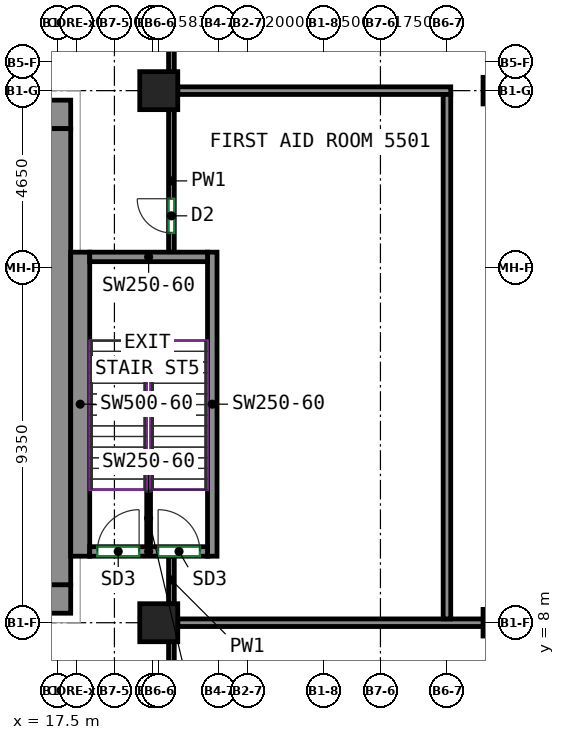
"""IFC4 building model, lengths in metres.
Left out: names, types, materials, properties, quantities, classifications, styles, units other than length and angle.
Written with IfcOpenShell. Run it as: python <this file> out.ifc"""

import sys

from ifc_helpers import new_model, si_unit, direction, frame, frame_2d, origin, origin_2d, place, context, subcontext, project, spatial, rectangle, extrude, source, transform, mapped, element, fill, save


model = new_model("IFC4")
c1 = context("Model", 3, precision=1e-05, world=origin(), true_north=direction((0.0, 1.0)))
c2 = subcontext(c1, "Body", "Model", "MODEL_VIEW")
j1 = project(units=[si_unit("LENGTHUNIT", "METRE"), si_unit("PLANEANGLEUNIT", "RADIAN")], contexts=[c1])
p1 = place(None, origin())
s1 = spatial("IfcSite", under=j1, at=p1, CompositionType="ELEMENT")
p2 = place(p1, origin())
s2 = spatial("IfcBuilding", under=s1, at=p2, CompositionType="ELEMENT")
p3 = place(p2, frame((0.0, 0.0, 223.7)))
s3 = spatial("IfcBuildingStorey", under=s2, at=p3, CompositionType="ELEMENT", Elevation=223.7)
m1 = source(origin(), c2, "Body", "SweptSolid", [
    extrude(rectangle(XDim=1.0, YDim=1.0, at=origin_2d()), origin(), (0.0, 0.0, 1.0), 5.5),
])
for number, where, z_axis, x_axis in (
    (1, (20.167, 8.0, 0.0), (0.0, 0.0, 1.0), (1.0, 0.0, 0.0)),
    (2, (20.167, 22.0, 0.0), (0.0, 0.0, 1.0), (1.0, 0.0, 0.0)),
):
    element("IfcColumn", number, at=place(p3, frame(where, z_axis=z_axis, x_axis=x_axis)), inside=s3, PredefinedType="COLUMN", context=c2, shape_type="MappedRepresentation", body=[
        mapped(m1, transform((0.0, 0.0, 0.0))),
    ])
m2 = source(origin(), c2, "Body", "SweptSolid", [
    extrude(rectangle(XDim=0.7, YDim=0.7, at=origin_2d()), origin(), (0.0, 0.0, 1.0), 9.5),
])
for number, where, z_axis, x_axis in (
    (3, (29.05, 8.0, 0.0), (0.0, 0.0, 1.0), (1.0, 0.0, 0.0)),
    (4, (29.05, 22.0, 0.0), (0.0, 0.0, 1.0), (1.0, 0.0, 0.0)),
):
    element("IfcColumn", number, at=place(p3, frame(where, z_axis=z_axis, x_axis=x_axis)), inside=s3, PredefinedType="COLUMN", context=c2, shape_type="MappedRepresentation", body=[
        mapped(m2, transform((0.0, 0.0, 0.0))),
    ])
m3 = source(origin(), c2, "Body", "SweptSolid", [
    extrude(rectangle(XDim=5.38, YDim=0.75, at=frame_2d((2.69, 0.0))), origin(), (0.0, 0.0, 1.0), 9.5),
])
p4 = place(p3, frame((12.47, 8.625, 0.0), z_axis=(0.0, 0.0, 1.0), x_axis=(1.0, 0.0, 0.0)))
e5 = element("IfcWall", 5, at=p4, inside=s3, PredefinedType="SHEAR", context=c2, shape_type="MappedRepresentation", body=[
    mapped(m3, transform((0.0, 0.0, 0.0))),
])
p5 = place(p4, frame((1.28, 0.0, 0.0)))
e6 = element("IfcOpeningElement", 6, at=p5, cuts=e5, PredefinedType="OPENING", context=c2, shape_type="SweptSolid", body=[
    extrude(rectangle(XDim=1.1, YDim=2.1, at=frame_2d((0.55, 1.05))), frame((0.0, 0.385, 0.0), z_axis=(0.0, -1.0, 0.0), x_axis=(1.0, 0.0, 0.0)), (0.0, 0.0, 1.0), 0.77),
])
p6 = place(p4, frame((3.18, 0.0, 0.0)))
e7 = element("IfcOpeningElement", 7, at=p6, cuts=e5, PredefinedType="OPENING", context=c2, shape_type="SweptSolid", body=[
    extrude(rectangle(XDim=1.1, YDim=2.1, at=frame_2d((0.55, 1.05))), frame((0.0, 0.385, 0.0), z_axis=(0.0, -1.0, 0.0), x_axis=(1.0, 0.0, 0.0)), (0.0, 0.0, 1.0), 0.77),
])
m4 = source(origin(), c2, "Body", "SweptSolid", [
    extrude(rectangle(XDim=33.6, YDim=0.75, at=frame_2d((16.8, 0.0))), origin(), (0.0, 0.0, 1.0), 9.5),
])
p7 = place(p3, frame((-15.75, 21.375, 0.0), z_axis=(0.0, 0.0, 1.0), x_axis=(1.0, 0.0, 0.0)))
e8 = element("IfcWall", 8, at=p7, inside=s3, PredefinedType="SHEAR", context=c2, shape_type="MappedRepresentation", body=[
    mapped(m4, transform((0.0, 0.0, 0.0))),
])
p8 = place(p7, frame((6.581, 0.0, 0.0)))
e9 = element("IfcOpeningElement", 9, at=p8, cuts=e8, PredefinedType="OPENING", context=c2, shape_type="SweptSolid", body=[
    extrude(rectangle(XDim=0.9, YDim=2.1, at=frame_2d((0.45, 1.05))), frame((0.0, 0.385, 0.0), z_axis=(0.0, -1.0, 0.0), x_axis=(1.0, 0.0, 0.0)), (0.0, 0.0, 1.0), 0.77),
])
p9 = place(p7, frame((11.888, 0.0, 0.0)))
e10 = element("IfcOpeningElement", 10, at=p9, cuts=e8, PredefinedType="OPENING", context=c2, shape_type="SweptSolid", body=[
    extrude(rectangle(XDim=0.9, YDim=2.1, at=frame_2d((0.45, 1.05))), frame((0.0, 0.385, 0.0), z_axis=(0.0, -1.0, 0.0), x_axis=(1.0, 0.0, 0.0)), (0.0, 0.0, 1.0), 0.77),
])
p10 = place(p7, frame((16.296, 0.0, 0.0)))
e11 = element("IfcOpeningElement", 11, at=p10, cuts=e8, PredefinedType="OPENING", context=c2, shape_type="SweptSolid", body=[
    extrude(rectangle(XDim=0.9, YDim=2.1, at=frame_2d((0.45, 1.05))), frame((0.0, 0.385, 0.0), z_axis=(0.0, -1.0, 0.0), x_axis=(1.0, 0.0, 0.0)), (0.0, 0.0, 1.0), 0.77),
])
p11 = place(p7, frame((18.708, 0.0, 0.0)))
e12 = element("IfcOpeningElement", 12, at=p11, cuts=e8, PredefinedType="OPENING", context=c2, shape_type="SweptSolid", body=[
    extrude(rectangle(XDim=0.9, YDim=2.1, at=frame_2d((0.45, 1.05))), frame((0.0, 0.385, 0.0), z_axis=(0.0, -1.0, 0.0), x_axis=(1.0, 0.0, 0.0)), (0.0, 0.0, 1.0), 0.77),
])
p12 = place(p7, frame((21.536, 0.0, 0.0)))
e13 = element("IfcOpeningElement", 13, at=p12, cuts=e8, PredefinedType="OPENING", context=c2, shape_type="SweptSolid", body=[
    extrude(rectangle(XDim=0.9, YDim=2.1, at=frame_2d((0.45, 1.05))), frame((0.0, 0.385, 0.0), z_axis=(0.0, -1.0, 0.0), x_axis=(1.0, 0.0, 0.0)), (0.0, 0.0, 1.0), 0.77),
])
p13 = place(p7, frame((25.877, 0.0, 0.0)))
e14 = element("IfcOpeningElement", 14, at=p13, cuts=e8, PredefinedType="OPENING", context=c2, shape_type="SweptSolid", body=[
    extrude(rectangle(XDim=0.9, YDim=2.1, at=frame_2d((0.45, 1.05))), frame((0.0, 0.385, 0.0), z_axis=(0.0, -1.0, 0.0), x_axis=(1.0, 0.0, 0.0)), (0.0, 0.0, 1.0), 0.77),
])
p14 = place(p7, frame((2.275, 0.0, 0.0)))
e15 = element("IfcOpeningElement", 15, at=p14, cuts=e8, PredefinedType="OPENING", context=c2, shape_type="SweptSolid", body=[
    extrude(rectangle(XDim=0.9, YDim=2.1, at=frame_2d((0.45, 1.05))), frame((0.0, 0.385, 0.0), z_axis=(0.0, -1.0, 0.0), x_axis=(1.0, 0.0, 0.0)), (0.0, 0.0, 1.0), 0.77),
])
p15 = place(p7, frame((30.425, 0.0, 0.0)))
e16 = element("IfcOpeningElement", 16, at=p15, cuts=e8, PredefinedType="OPENING", context=c2, shape_type="SweptSolid", body=[
    extrude(rectangle(XDim=0.9, YDim=2.1, at=frame_2d((0.45, 1.05))), frame((0.0, 0.385, 0.0), z_axis=(0.0, -1.0, 0.0), x_axis=(1.0, 0.0, 0.0)), (0.0, 0.0, 1.0), 0.77),
])
m5 = source(origin(), c2, "Body", "SweptSolid", [
    extrude(rectangle(XDim=12.0, YDim=0.75, at=frame_2d((6.0, 0.0))), origin(), (0.0, 0.0, 1.0), 9.5),
])
p16 = place(p3, frame((17.475, 9.0, 0.0), z_axis=(0.0, 0.0, 1.0), x_axis=(0.0, 1.0, 0.0)))
e17 = element("IfcWall", 17, at=p16, inside=s3, PredefinedType="SHEAR", context=c2, shape_type="MappedRepresentation", body=[
    mapped(m5, transform((0.0, 0.0, 0.0))),
])
m6 = source(origin(), c2, "Body", "SweptSolid", [
    extrude(rectangle(XDim=8.0, YDim=0.5, at=frame_2d((4.0, 0.0))), origin(), (0.0, 0.0, 1.0), 9.5),
])
p17 = place(p3, frame((18.1, 9.75, 0.0), z_axis=(0.0, 0.0, 1.0), x_axis=(0.0, 1.0, 0.0)))
e18 = element("IfcWall", 18, at=p17, inside=s3, PredefinedType="SHEAR", context=c2, shape_type="MappedRepresentation", body=[
    mapped(m6, transform((0.0, 0.0, 0.0))),
])
m7 = source(origin(), c2, "Body", "SweptSolid", [
    extrude(rectangle(XDim=8.0, YDim=0.25, at=frame_2d((4.0, 0.0))), origin(), (0.0, 0.0, 1.0), 9.5),
])
p18 = place(p3, frame((21.575, 9.75, 0.0), z_axis=(0.0, 0.0, 1.0), x_axis=(0.0, 1.0, 0.0)))
e19 = element("IfcWall", 19, at=p18, inside=s3, PredefinedType="SHEAR", context=c2, shape_type="MappedRepresentation", body=[
    mapped(m7, transform((0.0, 0.0, 0.0))),
])
m8 = source(origin(), c2, "Body", "SweptSolid", [
    extrude(rectangle(XDim=3.1, YDim=0.25, at=frame_2d((1.55, 0.0))), origin(), (0.0, 0.0, 1.0), 9.5),
])
p19 = place(p3, frame((18.35, 9.875, 0.0), z_axis=(0.0, 0.0, 1.0), x_axis=(1.0, 0.0, 0.0)))
e20 = element("IfcWall", 20, at=p19, inside=s3, PredefinedType="SHEAR", context=c2, shape_type="MappedRepresentation", body=[
    mapped(m8, transform((0.0, 0.0, 0.0))),
])
p20 = place(p19, frame((0.2, 0.0, 0.0)))
e21 = element("IfcOpeningElement", 21, at=p20, cuts=e20, PredefinedType="OPENING", context=c2, shape_type="SweptSolid", body=[
    extrude(rectangle(XDim=1.1, YDim=2.1, at=frame_2d((0.55, 1.05))), frame((0.0, 0.135, 0.0), z_axis=(0.0, -1.0, 0.0), x_axis=(1.0, 0.0, 0.0)), (0.0, 0.0, 1.0), 0.27),
])
p21 = place(p19, frame((1.8, 0.0, 0.0)))
e22 = element("IfcOpeningElement", 22, at=p21, cuts=e20, PredefinedType="OPENING", context=c2, shape_type="SweptSolid", body=[
    extrude(rectangle(XDim=1.1, YDim=2.1, at=frame_2d((0.55, 1.05))), frame((0.0, 0.135, 0.0), z_axis=(0.0, -1.0, 0.0), x_axis=(1.0, 0.0, 0.0)), (0.0, 0.0, 1.0), 0.27),
])
p22 = place(p3, frame((18.35, 17.625, 0.0), z_axis=(0.0, 0.0, 1.0), x_axis=(1.0, 0.0, 0.0)))
e23 = element("IfcWall", 23, at=p22, inside=s3, PredefinedType="SHEAR", context=c2, shape_type="MappedRepresentation", body=[
    mapped(m8, transform((0.0, 0.0, 0.0))),
])
m9 = source(origin(), c2, "Body", "SweptSolid", [
    extrude(rectangle(XDim=1.5, YDim=0.1, at=frame_2d((0.75, 0.0))), origin(), (0.0, 0.0, 1.0), 4.75),
])
p23 = place(p3, frame((19.9, 10.0, 0.0), z_axis=(0.0, 0.0, 1.0), x_axis=(0.0, 1.0, 0.0)))
e24 = element("IfcWall", 24, at=p23, inside=s3, PredefinedType="PARTITIONING", context=c2, shape_type="MappedRepresentation", body=[
    mapped(m9, transform((0.0, 0.0, 0.0))),
])
p24 = place(p3, frame((20.5, 3.475, 0.0), z_axis=(0.0, 0.0, 1.0), x_axis=(0.0, 1.0, 0.0)))
e25 = element("IfcWall", 25, at=p24, inside=s3, PredefinedType="PARTITIONING", context=c2, shape_type="SweptSolid", body=[
    extrude(rectangle(XDim=4.025, YDim=0.15, at=frame_2d((2.012, 0.0))), origin(), (0.0, 0.0, 1.0), 5.5),
])
p25 = place(p3, frame((20.5, 17.75, 0.0), z_axis=(0.0, 0.0, 1.0), x_axis=(0.0, 1.0, 0.0)))
e26 = element("IfcWall", 26, at=p25, inside=s3, PredefinedType="PARTITIONING", context=c2, shape_type="SweptSolid", body=[
    extrude(rectangle(XDim=3.75, YDim=0.15, at=frame_2d((1.875, 0.0))), origin(), (0.0, 0.0, 1.0), 9.5),
])
p26 = place(p25, frame((0.506, 0.0, 0.0)))
e27 = element("IfcOpeningElement", 27, at=p26, cuts=e26, PredefinedType="OPENING", context=c2, shape_type="SweptSolid", body=[
    extrude(rectangle(XDim=0.9, YDim=2.1, at=frame_2d((0.45, 1.05))), frame((0.0, 0.085, 0.0), z_axis=(0.0, -1.0, 0.0), x_axis=(1.0, 0.0, 0.0)), (0.0, 0.0, 1.0), 0.17),
])
p27 = place(p3, frame((20.5, 8.5, 0.0), z_axis=(0.0, 0.0, 1.0), x_axis=(0.0, 1.0, 0.0)))
e28 = element("IfcWall", 28, at=p27, inside=s3, PredefinedType="PARTITIONING", context=c2, shape_type="SweptSolid", body=[
    extrude(rectangle(XDim=1.25, YDim=0.15, at=frame_2d((0.625, 0.0))), origin(), (0.0, 0.0, 1.0), 9.5),
])
p28 = place(p3, frame((20.5, 22.5, 0.0), z_axis=(0.0, 0.0, 1.0), x_axis=(0.0, 1.0, 0.0)))
e29 = element("IfcWall", 29, at=p28, inside=s3, PredefinedType="PARTITIONING", context=c2, shape_type="SweptSolid", body=[
    extrude(rectangle(XDim=1.425, YDim=0.15, at=frame_2d((0.712, 0.0))), origin(), (0.0, 0.0, 1.0), 5.5),
])
p29 = place(p3, frame((20.667, 8.0, 0.0), z_axis=(0.0, 0.0, 1.0), x_axis=(1.0, 0.0, 0.0)))
e30 = element("IfcWall", 30, at=p29, inside=s3, PredefinedType="PARTITIONING", context=c2, shape_type="SweptSolid", body=[
    extrude(rectangle(XDim=9.758, YDim=0.2, at=frame_2d((4.879, 0.0))), origin(), (0.0, 0.0, 1.0), 9.5),
])
p30 = place(p3, frame((27.85, 22.0, 0.0), z_axis=(0.0, 0.0, 1.0), x_axis=(-1.0, 0.0, 0.0)))
e31 = element("IfcWall", 31, at=p30, inside=s3, PredefinedType="PARTITIONING", context=c2, shape_type="SweptSolid", body=[
    extrude(rectangle(XDim=7.183, YDim=0.2, at=frame_2d((3.592, 0.0))), origin(), (0.0, 0.0, 1.0), 9.5),
])
p31 = place(p3, frame((27.75, 8.1, 0.0), z_axis=(0.0, 0.0, 1.0), x_axis=(0.0, 1.0, 0.0)))
e32 = element("IfcWall", 32, at=p31, inside=s3, PredefinedType="PARTITIONING", context=c2, shape_type="SweptSolid", body=[
    extrude(rectangle(XDim=13.8, YDim=0.2, at=frame_2d((6.9, 0.0))), origin(), (0.0, 0.0, 1.0), 9.5),
])
p32 = place(p20, origin())
e33 = element("IfcDoor", 33, at=p32, inside=s3, OperationType="SINGLE_SWING_RIGHT", PredefinedType="DOOR", context=c2, shape_type="SweptSolid", body=[
    extrude(rectangle(XDim=1.1, YDim=2.1, at=frame_2d((0.55, 1.05))), frame((0.0, 0.025, 0.0), z_axis=(0.0, -1.0, 0.0), x_axis=(1.0, 0.0, 0.0)), (0.0, 0.0, 1.0), 0.05),
])
fill(e21, e33)
p33 = place(p21, origin())
e34 = element("IfcDoor", 34, at=p33, inside=s3, OperationType="SINGLE_SWING_LEFT", PredefinedType="DOOR", context=c2, shape_type="SweptSolid", body=[
    extrude(rectangle(XDim=1.1, YDim=2.1, at=frame_2d((0.55, 1.05))), frame((0.0, 0.025, 0.0), z_axis=(0.0, -1.0, 0.0), x_axis=(1.0, 0.0, 0.0)), (0.0, 0.0, 1.0), 0.05),
])
fill(e22, e34)
p34 = place(p26, origin())
e35 = element("IfcDoor", 35, at=p34, inside=s3, OperationType="SINGLE_SWING_RIGHT", PredefinedType="DOOR", context=c2, shape_type="SweptSolid", body=[
    extrude(rectangle(XDim=0.9, YDim=2.1, at=frame_2d((0.45, 1.05))), frame((0.0, 0.025, 0.0), z_axis=(0.0, -1.0, 0.0), x_axis=(1.0, 0.0, 0.0)), (0.0, 0.0, 1.0), 0.05),
])
fill(e27, e35)
save(model, sys.argv[1])
